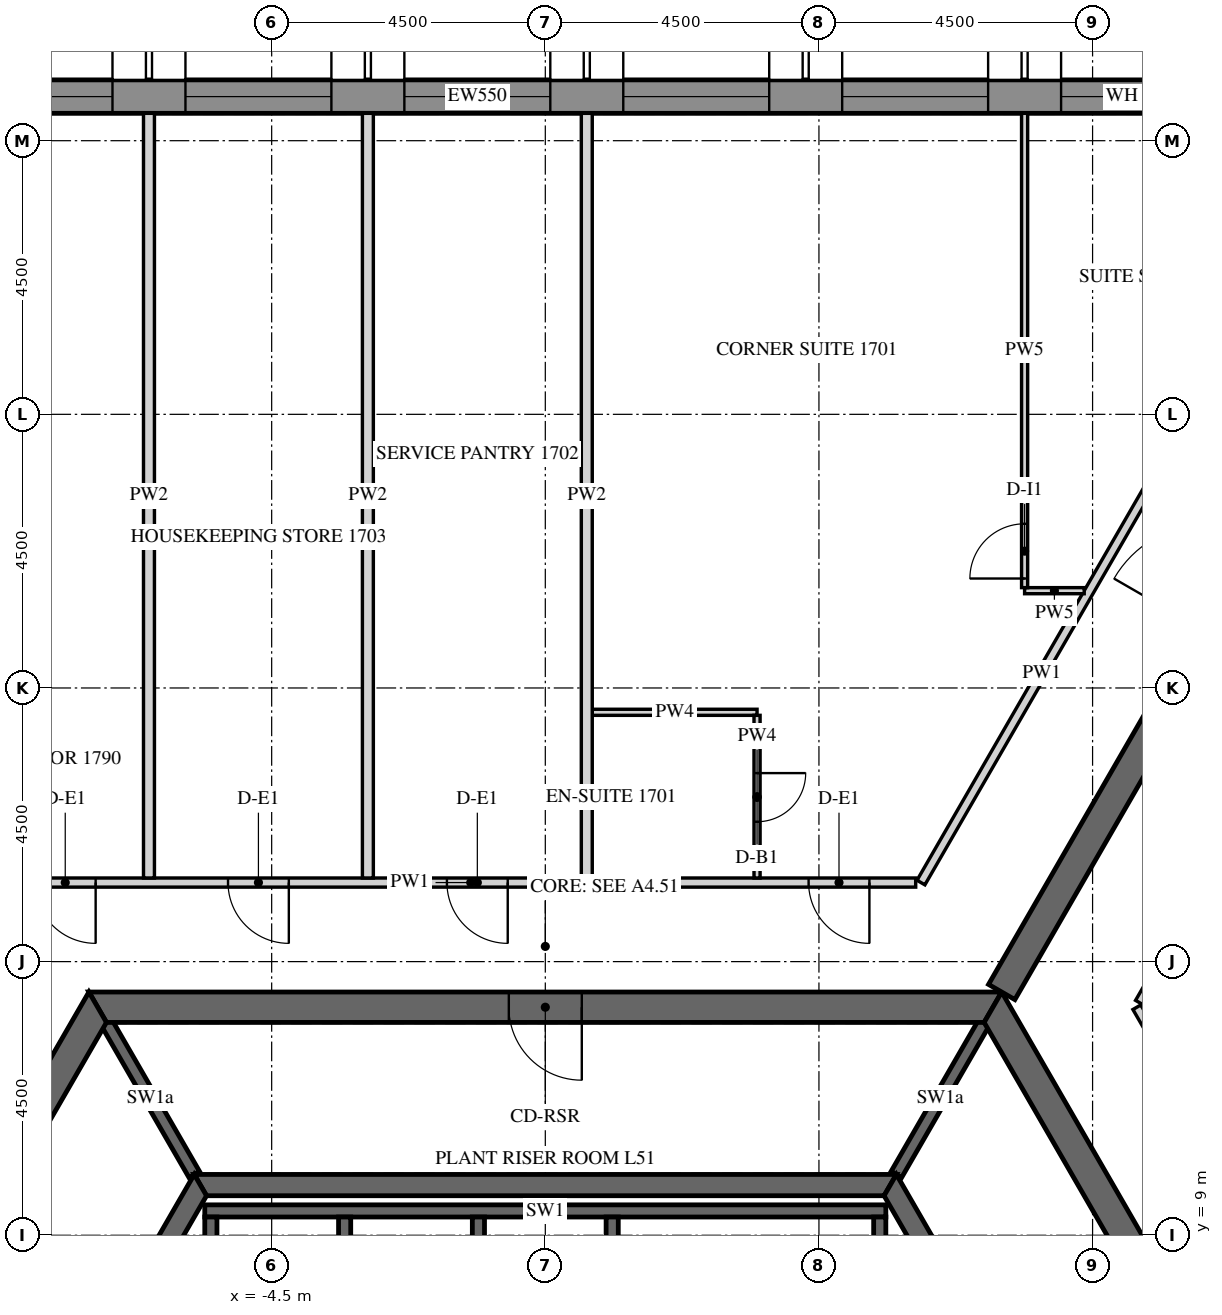
"""IFC4 building model, lengths in metres.
Left out: names, types, materials, properties, quantities, classifications, styles, units other than length and angle.
Written with IfcOpenShell. Run it as: python <this file> out.ifc"""

import sys

from ifc_helpers import new_model, si_unit, direction, frame, frame_2d, origin, place, context, subcontext, project, spatial, polyline, rectangle, outline, extrude, element, fill, save


model = new_model("IFC4")
c1 = context("Model", 3, precision=1e-05, world=origin(), true_north=direction((0.0, 1.0)))
c2 = subcontext(c1, "Body", "Model", "MODEL_VIEW")
j1 = project(units=[si_unit("LENGTHUNIT", "METRE"), si_unit("PLANEANGLEUNIT", "RADIAN")], contexts=[c1])
p1 = place(None, origin())
s1 = spatial("IfcSite", under=j1, at=p1, CompositionType="ELEMENT")
p2 = place(p1, origin())
s2 = spatial("IfcBuilding", under=s1, at=p2, CompositionType="ELEMENT")
p3 = place(p2, frame((0.0, 0.0, 215.1)))
s3 = spatial("IfcBuildingStorey", under=s2, at=p3, CompositionType="ELEMENT", Elevation=215.1)
p4 = place(p3, frame((12.761, 27.725, -0.15), z_axis=(0.0, 0.0, 1.0), x_axis=(-1.0, 0.0, 0.0)))
e1 = element("IfcWall", 1, at=p4, inside=s3, PredefinedType="SOLIDWALL", context=c2, shape_type="SweptSolid", body=[
    extrude(outline(polyline([(-0.022, -0.275), (27.783, -0.275), (27.732, 0.275), (0.022, 0.275), (-0.022, -0.275)])), origin(), (0.0, 0.0, 1.0), 3.9),
])
p5 = place(p4, frame((1.879, 0.0, 1.05)))
e2 = element("IfcOpeningElement", 2, at=p5, cuts=e1, PredefinedType="OPENING", context=c2, shape_type="SweptSolid", body=[
    extrude(rectangle(XDim=2.4, YDim=2.4, at=frame_2d((1.2, 1.2))), frame((0.0, 0.285, 0.0), z_axis=(0.0, -1.0, 0.0), x_axis=(1.0, 0.0, 0.0)), (0.0, 0.0, 1.0), 0.57),
])
p6 = place(p4, frame((5.479, 0.0, 1.05)))
e3 = element("IfcOpeningElement", 3, at=p6, cuts=e1, PredefinedType="OPENING", context=c2, shape_type="SweptSolid", body=[
    extrude(rectangle(XDim=2.4, YDim=2.4, at=frame_2d((1.2, 1.2))), frame((0.0, 0.285, 0.0), z_axis=(0.0, -1.0, 0.0), x_axis=(1.0, 0.0, 0.0)), (0.0, 0.0, 1.0), 0.57),
])
p7 = place(p4, frame((9.079, 0.0, 1.05)))
e4 = element("IfcOpeningElement", 4, at=p7, cuts=e1, PredefinedType="OPENING", context=c2, shape_type="SweptSolid", body=[
    extrude(rectangle(XDim=2.4, YDim=2.4, at=frame_2d((1.2, 1.2))), frame((0.0, 0.285, 0.0), z_axis=(0.0, -1.0, 0.0), x_axis=(1.0, 0.0, 0.0)), (0.0, 0.0, 1.0), 0.57),
])
p8 = place(p4, frame((12.679, 0.0, 1.05)))
e5 = element("IfcOpeningElement", 5, at=p8, cuts=e1, PredefinedType="OPENING", context=c2, shape_type="SweptSolid", body=[
    extrude(rectangle(XDim=2.4, YDim=2.4, at=frame_2d((1.2, 1.2))), frame((0.0, 0.285, 0.0), z_axis=(0.0, -1.0, 0.0), x_axis=(1.0, 0.0, 0.0)), (0.0, 0.0, 1.0), 0.57),
])
p9 = place(p4, frame((16.279, 0.0, 1.05)))
e6 = element("IfcOpeningElement", 6, at=p9, cuts=e1, PredefinedType="OPENING", context=c2, shape_type="SweptSolid", body=[
    extrude(rectangle(XDim=2.4, YDim=2.4, at=frame_2d((1.2, 1.2))), frame((0.0, 0.285, 0.0), z_axis=(0.0, -1.0, 0.0), x_axis=(1.0, 0.0, 0.0)), (0.0, 0.0, 1.0), 0.57),
])
p10 = place(p4, frame((19.879, 0.0, 1.05)))
e7 = element("IfcOpeningElement", 7, at=p10, cuts=e1, PredefinedType="OPENING", context=c2, shape_type="SweptSolid", body=[
    extrude(rectangle(XDim=2.4, YDim=2.4, at=frame_2d((1.2, 1.2))), frame((0.0, 0.285, 0.0), z_axis=(0.0, -1.0, 0.0), x_axis=(1.0, 0.0, 0.0)), (0.0, 0.0, 1.0), 0.57),
])
p11 = place(p4, frame((23.479, 0.0, 1.05)))
e8 = element("IfcOpeningElement", 8, at=p11, cuts=e1, PredefinedType="OPENING", context=c2, shape_type="SweptSolid", body=[
    extrude(rectangle(XDim=2.4, YDim=2.4, at=frame_2d((1.2, 1.2))), frame((0.0, 0.285, 0.0), z_axis=(0.0, -1.0, 0.0), x_axis=(1.0, 0.0, 0.0)), (0.0, 0.0, 1.0), 0.57),
])
p12 = place(p3, frame((-7.361, 12.75, -0.15), z_axis=(0.0, 0.0, 1.0), x_axis=(-0.50000571537, -0.866022103989, 0.0)))
e9 = element("IfcWall", 9, at=p12, inside=s3, PredefinedType="SHEAR", context=c2, shape_type="SweptSolid", body=[
    extrude(outline(polyline([(-0.144, -0.25), (14.867, -0.25), (14.578, 0.25), (0.144, 0.25), (-0.144, -0.25)])), origin(), (0.0, 0.0, 1.0), 3.9),
])
p13 = place(p12, frame((6.49, 0.0, 0.15)))
e10 = element("IfcOpeningElement", 10, at=p13, cuts=e9, PredefinedType="OPENING", context=c2, shape_type="SweptSolid", body=[
    extrude(rectangle(XDim=1.8, YDim=2.4, at=frame_2d((0.9, 1.2))), frame((0.0, 0.26, 0.0), z_axis=(0.0, -1.0, 0.0), x_axis=(1.0, 0.0, 0.0)), (0.0, 0.0, 1.0), 0.52),
])
p14 = place(p3, frame((14.722, 0.0, -0.15), z_axis=(0.0, 0.0, 1.0), x_axis=(-0.50000571537, 0.866022103989, 0.0)))
e11 = element("IfcWall", 11, at=p14, inside=s3, PredefinedType="SHEAR", context=c2, shape_type="SweptSolid", body=[
    extrude(outline(polyline([(-0.144, -0.25), (14.867, -0.25), (14.578, 0.25), (0.144, 0.25), (-0.144, -0.25)])), origin(), (0.0, 0.0, 1.0), 3.9),
])
p15 = place(p14, frame((6.432, 0.0, 0.15)))
e12 = element("IfcOpeningElement", 12, at=p15, cuts=e11, PredefinedType="OPENING", context=c2, shape_type="SweptSolid", body=[
    extrude(rectangle(XDim=1.8, YDim=2.4, at=frame_2d((0.9, 1.2))), frame((0.0, 0.26, 0.0), z_axis=(0.0, -1.0, 0.0), x_axis=(1.0, 0.0, 0.0)), (0.0, 0.0, 1.0), 0.52),
])
p16 = place(p3, frame((7.361, 12.75, -0.15), z_axis=(0.0, 0.0, 1.0), x_axis=(-1.0, 0.0, 0.0)))
e13 = element("IfcWall", 13, at=p16, inside=s3, PredefinedType="SHEAR", context=c2, shape_type="SweptSolid", body=[
    extrude(outline(polyline([(-0.144, -0.25), (14.866, -0.25), (14.578, 0.25), (0.144, 0.25), (-0.144, -0.25)])), origin(), (0.0, 0.0, 1.0), 3.9),
])
p17 = place(p16, frame((6.761, 0.0, 0.15)))
e14 = element("IfcOpeningElement", 14, at=p17, cuts=e13, PredefinedType="OPENING", context=c2, shape_type="SweptSolid", body=[
    extrude(rectangle(XDim=1.2, YDim=2.4, at=frame_2d((0.6, 1.2))), frame((0.0, 0.26, 0.0), z_axis=(0.0, -1.0, 0.0), x_axis=(1.0, 0.0, 0.0)), (0.0, 0.0, 1.0), 0.52),
])
p18 = place(p3, frame((7.506, 13.0, -0.15), z_axis=(0.0, 0.0, 1.0), x_axis=(0.499988271576, 0.866032175087, 0.0)))
e15 = element("IfcWall", 15, at=p18, inside=s3, PredefinedType="SHEAR", context=c2, shape_type="SweptSolid", body=[
    extrude(rectangle(XDim=15.424, YDim=0.5, at=frame_2d((7.712, 0.0))), origin(), (0.0, 0.0, 1.0), 3.9),
])
p19 = place(p18, frame((6.812, 0.0, 0.15)))
e16 = element("IfcOpeningElement", 16, at=p19, cuts=e15, PredefinedType="OPENING", context=c2, shape_type="SweptSolid", body=[
    extrude(rectangle(XDim=1.8, YDim=2.4, at=frame_2d((0.9, 1.2))), frame((0.0, 0.26, 0.0), z_axis=(0.0, -1.0, 0.0), x_axis=(1.0, 0.0, 0.0)), (0.0, 0.0, 1.0), 0.52),
])
p20 = place(p3, frame((-5.673, 9.825, -0.15), z_axis=(0.0, 0.0, 1.0), x_axis=(-0.499995046907, -0.866028263435, 0.0)))
e17 = element("IfcWall", 17, at=p20, inside=s3, PredefinedType="SHEAR", context=c2, shape_type="SweptSolid", body=[
    extrude(outline(polyline([(-0.101, -0.175), (11.446, -0.175), (11.244, 0.175), (0.101, 0.175), (-0.101, -0.175)])), origin(), (0.0, 0.0, 1.0), 3.9),
])
p21 = place(p20, frame((4.801, 0.0, 0.15)))
e18 = element("IfcOpeningElement", 18, at=p21, cuts=e17, PredefinedType="OPENING", context=c2, shape_type="SweptSolid", body=[
    extrude(rectangle(XDim=1.8, YDim=2.4, at=frame_2d((0.9, 1.2))), frame((0.0, 0.185, 0.0), z_axis=(0.0, -1.0, 0.0), x_axis=(1.0, 0.0, 0.0)), (0.0, 0.0, 1.0), 0.37),
])
p22 = place(p3, frame((11.345, 0.0, -0.15), z_axis=(0.0, 0.0, 1.0), x_axis=(-0.499995046907, 0.866028263435, 0.0)))
e19 = element("IfcWall", 19, at=p22, inside=s3, PredefinedType="SHEAR", context=c2, shape_type="SweptSolid", body=[
    extrude(outline(polyline([(-0.101, -0.175), (11.446, -0.175), (11.244, 0.175), (0.101, 0.175), (-0.101, -0.175)])), origin(), (0.0, 0.0, 1.0), 3.9),
])
p23 = place(p22, frame((4.744, 0.0, 0.15)))
e20 = element("IfcOpeningElement", 20, at=p23, cuts=e19, PredefinedType="OPENING", context=c2, shape_type="SweptSolid", body=[
    extrude(rectangle(XDim=1.8, YDim=2.4, at=frame_2d((0.9, 1.2))), frame((0.0, 0.185, 0.0), z_axis=(0.0, -1.0, 0.0), x_axis=(1.0, 0.0, 0.0)), (0.0, 0.0, 1.0), 0.37),
])
p24 = place(p3, frame((5.673, 9.825, -0.15), z_axis=(0.0, 0.0, 1.0), x_axis=(-1.0, 0.0, 0.0)))
e21 = element("IfcWall", 21, at=p24, inside=s3, PredefinedType="SHEAR", context=c2, shape_type="SweptSolid", body=[
    extrude(outline(polyline([(-0.101, -0.175), (11.446, -0.175), (11.244, 0.175), (0.101, 0.175), (-0.101, -0.175)])), origin(), (0.0, 0.0, 1.0), 3.9),
])
p25 = place(p3, frame((-5.6, 9.4, -0.25), z_axis=(0.0, 0.0, 1.0), x_axis=(1.0, 0.0, 0.0)))
e22 = element("IfcWall", 22, at=p25, inside=s3, PredefinedType="SHEAR", context=c2, shape_type="SweptSolid", body=[
    extrude(rectangle(XDim=11.2, YDim=0.2, at=frame_2d((5.6, 0.0))), origin(), (0.0, 0.0, 1.0), 3.9),
])
for number, where, z_axis, x_axis in (
    (23, (-5.5, 6.4, -0.25), (0.0, 0.0, 1.0), (0.0, 1.0, 0.0)),
    (24, (-3.3, 6.4, -0.25), (0.0, 0.0, 1.0), (0.0, 1.0, 0.0)),
    (25, (-1.1, 6.4, -0.25), (0.0, 0.0, 1.0), (0.0, 1.0, 0.0)),
    (26, (1.1, 6.4, -0.25), (0.0, 0.0, 1.0), (0.0, 1.0, 0.0)),
    (27, (5.5, 6.4, -0.25), (0.0, 0.0, 1.0), (0.0, 1.0, 0.0)),
):
    element("IfcWall", number, at=place(p3, frame(where, z_axis=z_axis, x_axis=x_axis)), inside=s3, PredefinedType="SHEAR", context=c2, shape_type="SweptSolid", body=[
        extrude(rectangle(XDim=2.9, YDim=0.2, at=frame_2d((1.45, 0.0))), origin(), (0.0, 0.0, 1.0), 3.9),
    ])
for number, where, z_axis, x_axis in (
    (28, (5.773, 10.0, -0.15), (0.0, 0.0, 1.0), (0.5, 0.866, 0.0)),
    (29, (-5.773, 10.0, -0.15), (0.0, 0.0, 1.0), (-0.5, 0.866, 0.0)),
):
    element("IfcWall", number, at=place(p3, frame(where, z_axis=z_axis, x_axis=x_axis)), inside=s3, PredefinedType="SHEAR", context=c2, shape_type="SweptSolid", body=[
        extrude(rectangle(XDim=2.887, YDim=0.2, at=frame_2d((1.443, 0.0))), origin(), (0.0, 0.0, 1.0), 3.9),
    ])
p26 = place(p3, frame((10.149, 21.678, 0.0), z_axis=(0.0, 0.0, 1.0), x_axis=(-0.499997422768, -0.866026891745, 0.0)))
e30 = element("IfcWall", 30, at=p26, inside=s3, PredefinedType="PARTITIONING", context=c2, shape_type="SweptSolid", body=[
    extrude(rectangle(XDim=7.942, YDim=0.15, at=frame_2d((3.971, 0.0))), origin(), (0.0, 0.0, 1.0), 2.988),
])
p27 = place(p3, frame((6.091, 14.8, 0.0), z_axis=(0.0, 0.0, 1.0), x_axis=(-1.0, 0.0, 0.0)))
e31 = element("IfcWall", 31, at=p27, inside=s3, PredefinedType="PARTITIONING", context=c2, shape_type="SweptSolid", body=[
    extrude(rectangle(XDim=14.636, YDim=0.15, at=frame_2d((7.318, 0.0))), origin(), (0.0, 0.0, 1.0), 2.988),
])
p28 = place(p27, frame((0.761, 0.0, 0.0)))
e32 = element("IfcOpeningElement", 32, at=p28, cuts=e31, PredefinedType="OPENING", context=c2, shape_type="SweptSolid", body=[
    extrude(rectangle(XDim=1.0, YDim=2.1, at=frame_2d((0.5, 1.05))), frame((0.0, 0.085, 0.0), z_axis=(0.0, -1.0, 0.0), x_axis=(1.0, 0.0, 0.0)), (0.0, 0.0, 1.0), 0.17),
])
p29 = place(p27, frame((6.709, 0.0, 0.0)))
e33 = element("IfcOpeningElement", 33, at=p29, cuts=e31, PredefinedType="OPENING", context=c2, shape_type="SweptSolid", body=[
    extrude(rectangle(XDim=1.0, YDim=2.1, at=frame_2d((0.5, 1.05))), frame((0.0, 0.085, 0.0), z_axis=(0.0, -1.0, 0.0), x_axis=(1.0, 0.0, 0.0)), (0.0, 0.0, 1.0), 0.17),
])
p30 = place(p27, frame((10.309, 0.0, 0.0)))
e34 = element("IfcOpeningElement", 34, at=p30, cuts=e31, PredefinedType="OPENING", context=c2, shape_type="SweptSolid", body=[
    extrude(rectangle(XDim=1.0, YDim=2.1, at=frame_2d((0.5, 1.05))), frame((0.0, 0.085, 0.0), z_axis=(0.0, -1.0, 0.0), x_axis=(1.0, 0.0, 0.0)), (0.0, 0.0, 1.0), 0.17),
])
p31 = place(p27, frame((13.486, 0.0, 0.0)))
e35 = element("IfcOpeningElement", 35, at=p31, cuts=e31, PredefinedType="OPENING", context=c2, shape_type="SweptSolid", body=[
    extrude(rectangle(XDim=1.0, YDim=2.1, at=frame_2d((0.5, 1.05))), frame((0.0, 0.085, 0.0), z_axis=(0.0, -1.0, 0.0), x_axis=(1.0, 0.0, 0.0)), (0.0, 0.0, 1.0), 0.17),
])
p32 = place(p3, frame((17.046, 0.075, 0.0), z_axis=(0.0, 0.0, 1.0), x_axis=(-0.500008833422, 0.866020303746, 0.0)))
e36 = element("IfcWall", 36, at=p32, inside=s3, PredefinedType="PARTITIONING", context=c2, shape_type="SweptSolid", body=[
    extrude(rectangle(XDim=14.636, YDim=0.15, at=frame_2d((7.318, 0.0))), origin(), (0.0, 0.0, 1.0), 2.988),
])
p33 = place(p32, frame((9.07, 0.0, 0.0)))
e37 = element("IfcOpeningElement", 37, at=p33, cuts=e36, PredefinedType="OPENING", context=c2, shape_type="SweptSolid", body=[
    extrude(rectangle(XDim=1.0, YDim=2.1, at=frame_2d((0.5, 1.05))), frame((0.0, 0.085, 0.0), z_axis=(0.0, -1.0, 0.0), x_axis=(1.0, 0.0, 0.0)), (0.0, 0.0, 1.0), 0.17),
])
p34 = place(p3, frame((9.772, 12.825, 0.0), z_axis=(0.0, 0.0, 1.0), x_axis=(0.499989830942, 0.866031274813, 0.0)))
e38 = element("IfcWall", 38, at=p34, inside=s3, PredefinedType="PARTITIONING", context=c2, shape_type="SweptSolid", body=[
    extrude(rectangle(XDim=7.93, YDim=0.15, at=frame_2d((3.965, 0.0))), origin(), (0.0, 0.0, 1.0), 2.988),
])
p35 = place(p34, frame((2.552, 0.0, 0.0)))
e39 = element("IfcOpeningElement", 39, at=p35, cuts=e38, PredefinedType="OPENING", context=c2, shape_type="SweptSolid", body=[
    extrude(rectangle(XDim=1.0, YDim=2.1, at=frame_2d((0.5, 1.05))), frame((0.0, 0.085, 0.0), z_axis=(0.0, -1.0, 0.0), x_axis=(1.0, 0.0, 0.0)), (0.0, 0.0, 1.0), 0.17),
])
p36 = place(p3, frame((0.772, 17.6, 0.0), z_axis=(0.0, 0.0, 1.0), x_axis=(1.0, 0.0, 0.0)))
e40 = element("IfcWall", 40, at=p36, inside=s3, PredefinedType="PARTITIONING", context=c2, shape_type="SweptSolid", body=[
    extrude(rectangle(XDim=2.71, YDim=0.1, at=frame_2d((1.355, 0.0))), origin(), (0.0, 0.0, 1.0), 2.988),
])
p37 = place(p3, frame((3.482, 17.55, 0.0), z_axis=(0.0, 0.0, 1.0), x_axis=(0.0, -1.0, 0.0)))
e41 = element("IfcWall", 41, at=p37, inside=s3, PredefinedType="PARTITIONING", context=c2, shape_type="SweptSolid", body=[
    extrude(rectangle(XDim=2.675, YDim=0.1, at=frame_2d((1.337, 0.0))), origin(), (0.0, 0.0, 1.0), 2.988),
])
p38 = place(p37, frame((0.95, 0.0, 0.0)))
e42 = element("IfcOpeningElement", 42, at=p38, cuts=e41, PredefinedType="OPENING", context=c2, shape_type="SweptSolid", body=[
    extrude(rectangle(XDim=0.8, YDim=2.1, at=frame_2d((0.4, 1.05))), frame((0.0, 0.06, 0.0), z_axis=(0.0, -1.0, 0.0), x_axis=(1.0, 0.0, 0.0)), (0.0, 0.0, 1.0), 0.12),
])
p39 = place(p3, frame((8.862, 19.6, 0.0), z_axis=(0.0, 0.0, 1.0), x_axis=(-1.0, 0.0, 0.0)))
e43 = element("IfcWall", 43, at=p39, inside=s3, PredefinedType="PARTITIONING", context=c2, shape_type="SweptSolid", body=[
    extrude(rectangle(XDim=0.98, YDim=0.1, at=frame_2d((0.49, 0.0))), origin(), (0.0, 0.0, 1.0), 2.988),
])
p40 = place(p3, frame((7.882, 19.65, 0.0), z_axis=(0.0, 0.0, 1.0), x_axis=(0.0, 1.0, 0.0)))
e44 = element("IfcWall", 44, at=p40, inside=s3, PredefinedType="PARTITIONING", context=c2, shape_type="SweptSolid", body=[
    extrude(rectangle(XDim=7.8, YDim=0.1, at=frame_2d((3.9, 0.0))), origin(), (0.0, 0.0, 1.0), 2.988),
])
p41 = place(p40, frame((0.15, 0.0, 0.0)))
e45 = element("IfcOpeningElement", 45, at=p41, cuts=e44, PredefinedType="OPENING", context=c2, shape_type="SweptSolid", body=[
    extrude(rectangle(XDim=0.9, YDim=2.1, at=frame_2d((0.45, 1.05))), frame((0.0, 0.06, 0.0), z_axis=(0.0, -1.0, 0.0), x_axis=(1.0, 0.0, 0.0)), (0.0, 0.0, 1.0), 0.12),
])
for number, where, z_axis, x_axis in (
    (46, (0.682, 27.45, 0.0), (0.0, 0.0, 1.0), (0.0, -1.0, 0.0)),
    (47, (-2.918, 27.45, 0.0), (0.0, 0.0, 1.0), (0.0, -1.0, 0.0)),
    (48, (-6.518, 27.45, 0.0), (0.0, 0.0, 1.0), (0.0, -1.0, 0.0)),
):
    element("IfcWall", number, at=place(p3, frame(where, z_axis=z_axis, x_axis=x_axis)), inside=s3, PredefinedType="PARTITIONING", context=c2, shape_type="SweptSolid", body=[
        extrude(rectangle(XDim=12.575, YDim=0.18, at=frame_2d((6.288, 0.0))), origin(), (0.0, 0.0, 1.0), 2.988),
    ])
p42 = place(p5, frame((0.0, 0.205, 0.0)))
e49 = element("IfcWindow", 49, at=p42, inside=s3, PartitioningType="DOUBLE_PANEL_VERTICAL", PredefinedType="WINDOW", context=c2, shape_type="SweptSolid", body=[
    extrude(rectangle(XDim=2.4, YDim=2.4, at=frame_2d((1.2, 1.2))), frame((0.0, 0.03, 0.0), z_axis=(0.0, -1.0, 0.0), x_axis=(1.0, 0.0, 0.0)), (0.0, 0.0, 1.0), 0.06),
])
fill(e2, e49)
p43 = place(p6, frame((0.0, 0.205, 0.0)))
e50 = element("IfcWindow", 50, at=p43, inside=s3, PartitioningType="DOUBLE_PANEL_VERTICAL", PredefinedType="WINDOW", context=c2, shape_type="SweptSolid", body=[
    extrude(rectangle(XDim=2.4, YDim=2.4, at=frame_2d((1.2, 1.2))), frame((0.0, 0.03, 0.0), z_axis=(0.0, -1.0, 0.0), x_axis=(1.0, 0.0, 0.0)), (0.0, 0.0, 1.0), 0.06),
])
fill(e3, e50)
p44 = place(p7, frame((0.0, 0.205, 0.0)))
e51 = element("IfcWindow", 51, at=p44, inside=s3, PartitioningType="DOUBLE_PANEL_VERTICAL", PredefinedType="WINDOW", context=c2, shape_type="SweptSolid", body=[
    extrude(rectangle(XDim=2.4, YDim=2.4, at=frame_2d((1.2, 1.2))), frame((0.0, 0.03, 0.0), z_axis=(0.0, -1.0, 0.0), x_axis=(1.0, 0.0, 0.0)), (0.0, 0.0, 1.0), 0.06),
])
fill(e4, e51)
p45 = place(p8, frame((0.0, 0.205, 0.0)))
e52 = element("IfcWindow", 52, at=p45, inside=s3, PartitioningType="DOUBLE_PANEL_VERTICAL", PredefinedType="WINDOW", context=c2, shape_type="SweptSolid", body=[
    extrude(rectangle(XDim=2.4, YDim=2.4, at=frame_2d((1.2, 1.2))), frame((0.0, 0.03, 0.0), z_axis=(0.0, -1.0, 0.0), x_axis=(1.0, 0.0, 0.0)), (0.0, 0.0, 1.0), 0.06),
])
fill(e5, e52)
p46 = place(p9, frame((0.0, 0.205, 0.0)))
e53 = element("IfcWindow", 53, at=p46, inside=s3, PartitioningType="DOUBLE_PANEL_VERTICAL", PredefinedType="WINDOW", context=c2, shape_type="SweptSolid", body=[
    extrude(rectangle(XDim=2.4, YDim=2.4, at=frame_2d((1.2, 1.2))), frame((0.0, 0.03, 0.0), z_axis=(0.0, -1.0, 0.0), x_axis=(1.0, 0.0, 0.0)), (0.0, 0.0, 1.0), 0.06),
])
fill(e6, e53)
p47 = place(p10, frame((0.0, 0.205, 0.0)))
e54 = element("IfcWindow", 54, at=p47, inside=s3, PartitioningType="DOUBLE_PANEL_VERTICAL", PredefinedType="WINDOW", context=c2, shape_type="SweptSolid", body=[
    extrude(rectangle(XDim=2.4, YDim=2.4, at=frame_2d((1.2, 1.2))), frame((0.0, 0.03, 0.0), z_axis=(0.0, -1.0, 0.0), x_axis=(1.0, 0.0, 0.0)), (0.0, 0.0, 1.0), 0.06),
])
fill(e7, e54)
p48 = place(p17, origin())
e55 = element("IfcDoor", 55, at=p48, inside=s3, OperationType="SINGLE_SWING_LEFT", PredefinedType="DOOR", context=c2, shape_type="SweptSolid", body=[
    extrude(rectangle(XDim=1.2, YDim=2.4, at=frame_2d((0.6, 1.2))), frame((0.0, 0.025, 0.0), z_axis=(0.0, -1.0, 0.0), x_axis=(1.0, 0.0, 0.0)), (0.0, 0.0, 1.0), 0.05),
])
fill(e14, e55)
p49 = place(p28, origin())
e56 = element("IfcDoor", 56, at=p49, inside=s3, OperationType="SINGLE_SWING_RIGHT", PredefinedType="DOOR", context=c2, shape_type="SweptSolid", body=[
    extrude(rectangle(XDim=1.0, YDim=2.1, at=frame_2d((0.5, 1.05))), frame((0.0, 0.025, 0.0), z_axis=(0.0, -1.0, 0.0), x_axis=(1.0, 0.0, 0.0)), (0.0, 0.0, 1.0), 0.05),
])
fill(e32, e56)
p50 = place(p38, origin())
e57 = element("IfcDoor", 57, at=p50, inside=s3, OperationType="SINGLE_SWING_LEFT", PredefinedType="DOOR", context=c2, shape_type="SweptSolid", body=[
    extrude(rectangle(XDim=0.8, YDim=2.1, at=frame_2d((0.4, 1.05))), frame((0.0, 0.025, 0.0), z_axis=(0.0, -1.0, 0.0), x_axis=(1.0, 0.0, 0.0)), (0.0, 0.0, 1.0), 0.05),
])
fill(e42, e57)
p51 = place(p41, origin())
e58 = element("IfcDoor", 58, at=p51, inside=s3, OperationType="SINGLE_SWING_RIGHT", PredefinedType="DOOR", context=c2, shape_type="SweptSolid", body=[
    extrude(rectangle(XDim=0.9, YDim=2.1, at=frame_2d((0.45, 1.05))), frame((0.0, 0.025, 0.0), z_axis=(0.0, -1.0, 0.0), x_axis=(1.0, 0.0, 0.0)), (0.0, 0.0, 1.0), 0.05),
])
fill(e45, e58)
p52 = place(p29, origin())
e59 = element("IfcDoor", 59, at=p52, inside=s3, OperationType="SINGLE_SWING_LEFT", PredefinedType="DOOR", context=c2, shape_type="SweptSolid", body=[
    extrude(rectangle(XDim=1.0, YDim=2.1, at=frame_2d((0.5, 1.05))), frame((0.0, 0.025, 0.0), z_axis=(0.0, -1.0, 0.0), x_axis=(1.0, 0.0, 0.0)), (0.0, 0.0, 1.0), 0.05),
])
fill(e33, e59)
p53 = place(p30, origin())
e60 = element("IfcDoor", 60, at=p53, inside=s3, OperationType="SINGLE_SWING_RIGHT", PredefinedType="DOOR", context=c2, shape_type="SweptSolid", body=[
    extrude(rectangle(XDim=1.0, YDim=2.1, at=frame_2d((0.5, 1.05))), frame((0.0, 0.025, 0.0), z_axis=(0.0, -1.0, 0.0), x_axis=(1.0, 0.0, 0.0)), (0.0, 0.0, 1.0), 0.05),
])
fill(e34, e60)
p54 = place(p31, origin())
e61 = element("IfcDoor", 61, at=p54, inside=s3, OperationType="SINGLE_SWING_LEFT", PredefinedType="DOOR", context=c2, shape_type="SweptSolid", body=[
    extrude(rectangle(XDim=1.0, YDim=2.1, at=frame_2d((0.5, 1.05))), frame((0.0, 0.025, 0.0), z_axis=(0.0, -1.0, 0.0), x_axis=(1.0, 0.0, 0.0)), (0.0, 0.0, 1.0), 0.05),
])
fill(e35, e61)
save(model, sys.argv[1])
